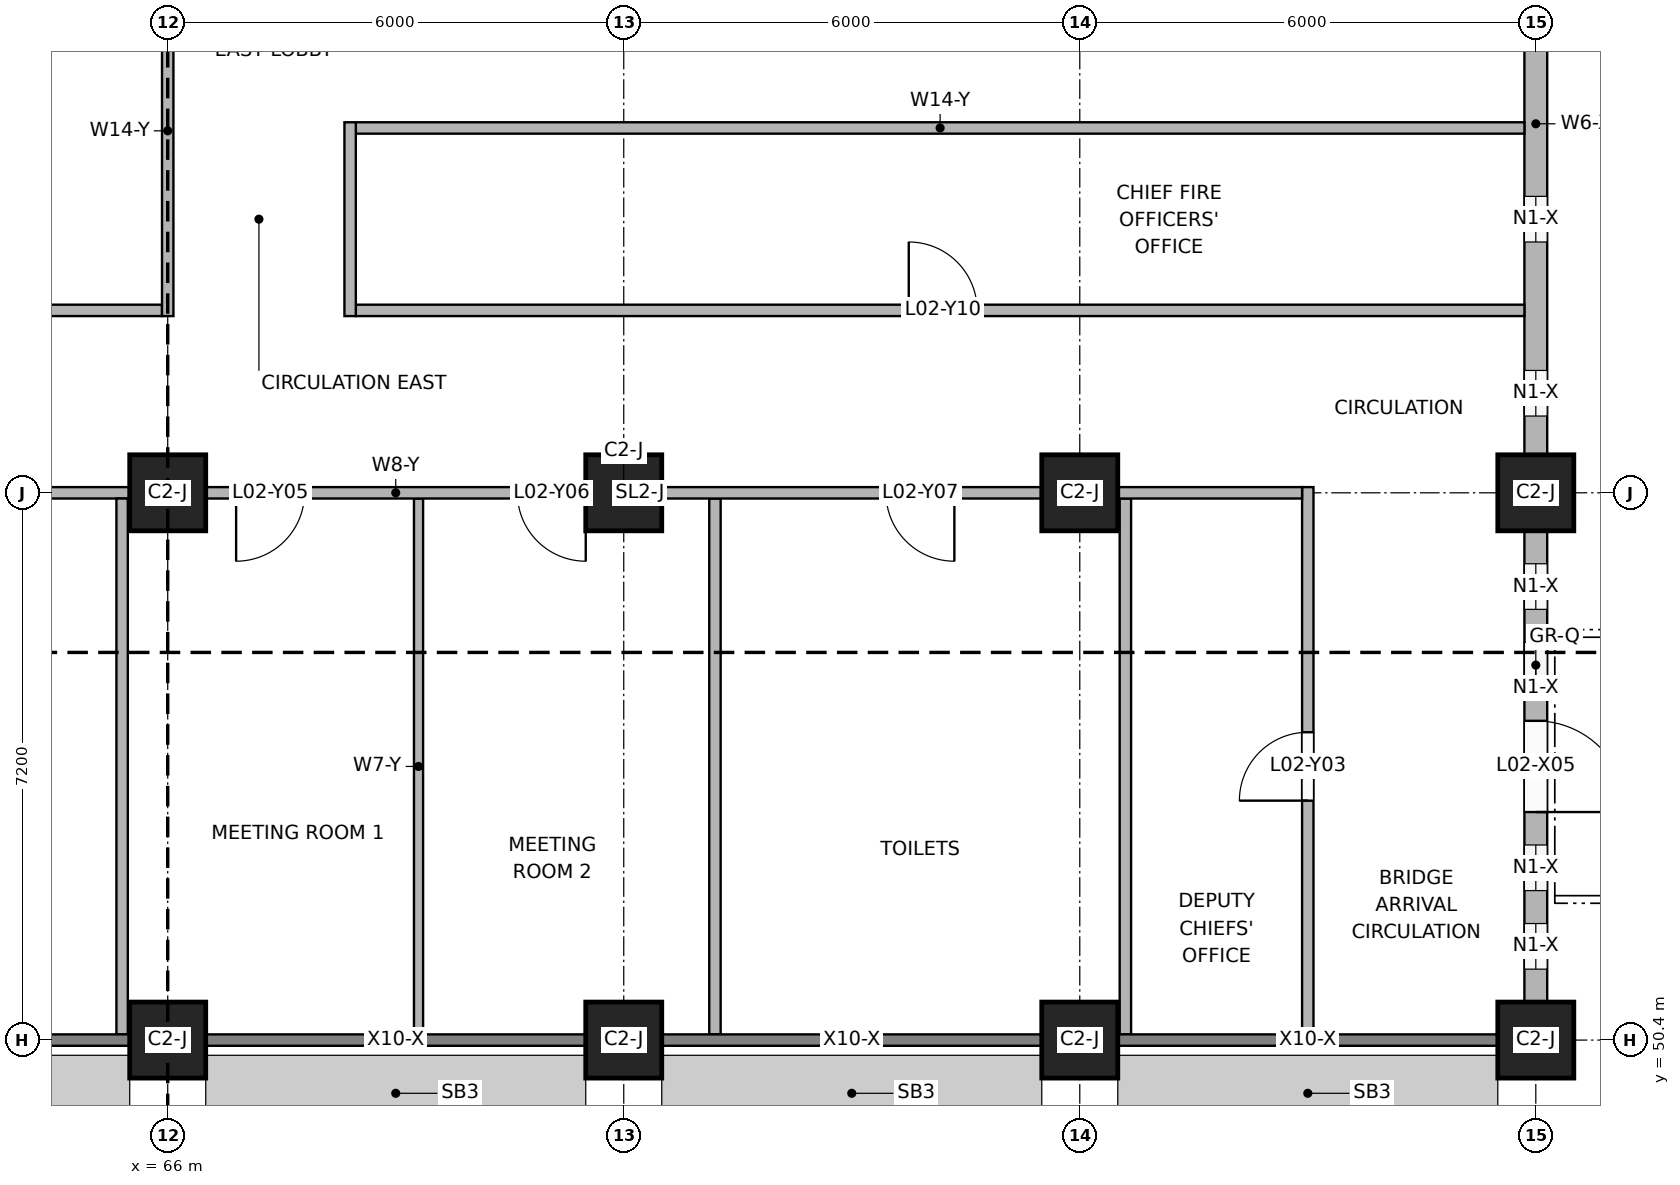
"""IFC4 building model, lengths in metres.
Left out: names, types, materials, properties, quantities, classifications, styles, units other than length and angle.
Written with IfcOpenShell. Run it as: python <this file> out.ifc"""

import sys

from ifc_helpers import new_model, si_unit, direction, frame, frame_2d, origin, origin_2d, place, context, subcontext, project, spatial, rectangle, extrude, element, fill, save


model = new_model("IFC4")
c1 = context("Model", 3, precision=1e-05, world=origin(), true_north=direction((0.0, 1.0)))
c2 = subcontext(c1, "Body", "Model", "MODEL_VIEW")
j1 = project(units=[si_unit("LENGTHUNIT", "METRE"), si_unit("PLANEANGLEUNIT", "RADIAN")], contexts=[c1])
p1 = place(None, origin())
s1 = spatial("IfcSite", under=j1, at=p1, CompositionType="ELEMENT")
p2 = place(p1, origin())
s2 = spatial("IfcBuilding", under=s1, at=p2, CompositionType="ELEMENT")
p3 = place(p2, frame((0.0, 0.0, 8.4)))
s3 = spatial("IfcBuildingStorey", under=s2, at=p3, CompositionType="ELEMENT", Elevation=8.4)
for number, where, z_axis, x_axis in (
    (1, (66.0, 50.4, 0.0), (0.0, 0.0, 1.0), (1.0, 0.0, 0.0)),
    (2, (72.0, 50.4, 0.0), (0.0, 0.0, 1.0), (1.0, 0.0, 0.0)),
    (3, (78.0, 50.4, 0.0), (0.0, 0.0, 1.0), (1.0, 0.0, 0.0)),
    (4, (84.0, 50.4, 0.0), (0.0, 0.0, 1.0), (1.0, 0.0, 0.0)),
    (5, (66.0, 57.6, 0.0), (0.0, 0.0, 1.0), (1.0, 0.0, 0.0)),
    (6, (72.0, 57.6, 0.0), (0.0, 0.0, 1.0), (1.0, 0.0, 0.0)),
    (7, (78.0, 57.6, 0.0), (0.0, 0.0, 1.0), (1.0, 0.0, 0.0)),
    (8, (84.0, 57.6, 0.0), (0.0, 0.0, 1.0), (1.0, 0.0, 0.0)),
):
    element("IfcColumn", number, at=place(p3, frame(where, z_axis=z_axis, x_axis=x_axis)), inside=s3, PredefinedType="COLUMN", context=c2, shape_type="SweptSolid", body=[
        extrude(rectangle(XDim=1.0, YDim=1.0, at=origin_2d()), origin(), (0.0, 0.0, 1.0), 4.0),
    ])
p4 = place(p3, frame((84.0, 50.9, 0.0), z_axis=(0.0, 0.0, 1.0), x_axis=(0.0, 1.0, 0.0)))
e9 = element("IfcWall", 9, at=p4, inside=s3, PredefinedType="SOLIDWALL", context=c2, shape_type="SweptSolid", body=[
    extrude(rectangle(XDim=6.2, YDim=0.3, at=frame_2d((3.1, 0.0))), origin(), (0.0, 0.0, 1.0), 3.1),
])
p5 = place(p4, frame((2.5, 0.0, 0.0)))
e10 = element("IfcOpeningElement", 10, at=p5, cuts=e9, PredefinedType="OPENING", context=c2, shape_type="SweptSolid", body=[
    extrude(rectangle(XDim=1.2, YDim=2.4, at=frame_2d((0.6, 1.2))), frame((0.0, 0.16, 0.0), z_axis=(0.0, -1.0, 0.0), x_axis=(1.0, 0.0, 0.0)), (0.0, 0.0, 1.0), 0.32),
])
p6 = place(p4, frame((0.433, 0.0, 0.9)))
e11 = element("IfcOpeningElement", 11, at=p6, cuts=e9, PredefinedType="OPENING", context=c2, shape_type="SweptSolid", body=[
    extrude(rectangle(XDim=0.6, YDim=1.9, at=frame_2d((0.3, 0.95))), frame((0.0, 0.16, 0.0), z_axis=(0.0, -1.0, 0.0), x_axis=(1.0, 0.0, 0.0)), (0.0, 0.0, 1.0), 0.32),
])
p7 = place(p4, frame((1.467, 0.0, 0.9)))
e12 = element("IfcOpeningElement", 12, at=p7, cuts=e9, PredefinedType="OPENING", context=c2, shape_type="SweptSolid", body=[
    extrude(rectangle(XDim=0.6, YDim=1.9, at=frame_2d((0.3, 0.95))), frame((0.0, 0.16, 0.0), z_axis=(0.0, -1.0, 0.0), x_axis=(1.0, 0.0, 0.0)), (0.0, 0.0, 1.0), 0.32),
])
p8 = place(p4, frame((4.133, 0.0, 0.9)))
e13 = element("IfcOpeningElement", 13, at=p8, cuts=e9, PredefinedType="OPENING", context=c2, shape_type="SweptSolid", body=[
    extrude(rectangle(XDim=0.6, YDim=1.9, at=frame_2d((0.3, 0.95))), frame((0.0, 0.16, 0.0), z_axis=(0.0, -1.0, 0.0), x_axis=(1.0, 0.0, 0.0)), (0.0, 0.0, 1.0), 0.32),
])
p9 = place(p4, frame((5.167, 0.0, 0.9)))
e14 = element("IfcOpeningElement", 14, at=p9, cuts=e9, PredefinedType="OPENING", context=c2, shape_type="SweptSolid", body=[
    extrude(rectangle(XDim=0.6, YDim=1.9, at=frame_2d((0.3, 0.95))), frame((0.0, 0.16, 0.0), z_axis=(0.0, -1.0, 0.0), x_axis=(1.0, 0.0, 0.0)), (0.0, 0.0, 1.0), 0.32),
])
p10 = place(p3, frame((84.0, 58.1, 0.0), z_axis=(0.0, 0.0, 1.0), x_axis=(0.0, 1.0, 0.0)))
e15 = element("IfcWall", 15, at=p10, inside=s3, PredefinedType="SOLIDWALL", context=c2, shape_type="SweptSolid", body=[
    extrude(rectangle(XDim=6.7, YDim=0.3, at=frame_2d((3.35, 0.0))), origin(), (0.0, 0.0, 1.0), 3.1),
])
p11 = place(p10, frame((0.51, 0.0, 0.9)))
e16 = element("IfcOpeningElement", 16, at=p11, cuts=e15, PredefinedType="OPENING", context=c2, shape_type="SweptSolid", body=[
    extrude(rectangle(XDim=0.6, YDim=1.9, at=frame_2d((0.3, 0.95))), frame((0.0, 0.16, 0.0), z_axis=(0.0, -1.0, 0.0), x_axis=(1.0, 0.0, 0.0)), (0.0, 0.0, 1.0), 0.32),
])
p12 = place(p10, frame((2.8, 0.0, 0.9)))
e17 = element("IfcOpeningElement", 17, at=p12, cuts=e15, PredefinedType="OPENING", context=c2, shape_type="SweptSolid", body=[
    extrude(rectangle(XDim=0.6, YDim=1.9, at=frame_2d((0.3, 0.95))), frame((0.0, 0.16, 0.0), z_axis=(0.0, -1.0, 0.0), x_axis=(1.0, 0.0, 0.0)), (0.0, 0.0, 1.0), 0.32),
])
p13 = place(p10, frame((5.34, 0.0, 0.9)))
e18 = element("IfcOpeningElement", 18, at=p13, cuts=e15, PredefinedType="OPENING", context=c2, shape_type="SweptSolid", body=[
    extrude(rectangle(XDim=0.6, YDim=1.9, at=frame_2d((0.3, 0.95))), frame((0.0, 0.16, 0.0), z_axis=(0.0, -1.0, 0.0), x_axis=(1.0, 0.0, 0.0)), (0.0, 0.0, 1.0), 0.32),
])
p14 = place(p3, frame((65.4, 50.475, 0.0), z_axis=(0.0, 0.0, 1.0), x_axis=(0.0, 1.0, 0.0)))
e19 = element("IfcWall", 19, at=p14, inside=s3, PredefinedType="PARTITIONING", context=c2, shape_type="SweptSolid", body=[
    extrude(rectangle(XDim=7.05, YDim=0.15, at=frame_2d((3.525, 0.0))), origin(), (0.0, 0.0, 1.0), 3.2),
])
p15 = place(p3, frame((66.0, 59.925, 0.0), z_axis=(0.0, 0.0, 1.0), x_axis=(0.0, 1.0, 0.0)))
e20 = element("IfcWall", 20, at=p15, inside=s3, PredefinedType="PARTITIONING", context=c2, shape_type="SweptSolid", body=[
    extrude(rectangle(XDim=4.875, YDim=0.15, at=frame_2d((2.438, 0.0))), origin(), (0.0, 0.0, 1.0), 4.0),
])
p16 = place(p3, frame((68.4, 59.925, 0.0), z_axis=(0.0, 0.0, 1.0), x_axis=(0.0, 1.0, 0.0)))
e21 = element("IfcWall", 21, at=p16, inside=s3, PredefinedType="PARTITIONING", context=c2, shape_type="SweptSolid", body=[
    extrude(rectangle(XDim=2.55, YDim=0.15, at=frame_2d((1.275, 0.0))), origin(), (0.0, 0.0, 1.0), 4.0),
])
p17 = place(p3, frame((69.3, 50.475, 0.0), z_axis=(0.0, 0.0, 1.0), x_axis=(0.0, 1.0, 0.0)))
e22 = element("IfcWall", 22, at=p17, inside=s3, PredefinedType="PARTITIONING", context=c2, shape_type="SweptSolid", body=[
    extrude(rectangle(XDim=7.05, YDim=0.12, at=frame_2d((3.525, 0.0))), origin(), (0.0, 0.0, 1.0), 3.2),
])
for number, where, z_axis, x_axis in (
    (23, (73.2, 50.475, 0.0), (0.0, 0.0, 1.0), (0.0, 1.0, 0.0)),
    (24, (78.6, 50.475, 0.0), (0.0, 0.0, 1.0), (0.0, 1.0, 0.0)),
):
    element("IfcWall", number, at=place(p3, frame(where, z_axis=z_axis, x_axis=x_axis)), inside=s3, PredefinedType="PARTITIONING", context=c2, shape_type="SweptSolid", body=[
        extrude(rectangle(XDim=7.05, YDim=0.15, at=frame_2d((3.525, 0.0))), origin(), (0.0, 0.0, 1.0), 3.2),
    ])
p18 = place(p3, frame((81.0, 50.475, 0.0), z_axis=(0.0, 0.0, 1.0), x_axis=(0.0, 1.0, 0.0)))
e25 = element("IfcWall", 25, at=p18, inside=s3, PredefinedType="PARTITIONING", context=c2, shape_type="SweptSolid", body=[
    extrude(rectangle(XDim=7.2, YDim=0.15, at=frame_2d((3.6, 0.0))), origin(), (0.0, 0.0, 1.0), 3.2),
])
p19 = place(p18, frame((3.075, 0.0, 0.0)))
e26 = element("IfcOpeningElement", 26, at=p19, cuts=e25, PredefinedType="OPENING", context=c2, shape_type="SweptSolid", body=[
    extrude(rectangle(XDim=0.9, YDim=2.1, at=frame_2d((0.45, 1.05))), frame((0.0, 0.085, 0.0), z_axis=(0.0, -1.0, 0.0), x_axis=(1.0, 0.0, 0.0)), (0.0, 0.0, 1.0), 0.17),
])
p20 = place(p3, frame((57.075, 57.6, 0.0), z_axis=(0.0, 0.0, 1.0), x_axis=(1.0, 0.0, 0.0)))
e27 = element("IfcWall", 27, at=p20, inside=s3, PredefinedType="PARTITIONING", context=c2, shape_type="SweptSolid", body=[
    extrude(rectangle(XDim=23.85, YDim=0.15, at=frame_2d((11.925, 0.0))), origin(), (0.0, 0.0, 1.0), 3.2),
])
p21 = place(p20, frame((3.525, 0.0, 0.0)))
e28 = element("IfcOpeningElement", 28, at=p21, cuts=e27, PredefinedType="OPENING", context=c2, shape_type="SweptSolid", body=[
    extrude(rectangle(XDim=1.2, YDim=2.1, at=frame_2d((0.6, 1.05))), frame((0.0, 0.085, 0.0), z_axis=(0.0, -1.0, 0.0), x_axis=(1.0, 0.0, 0.0)), (0.0, 0.0, 1.0), 0.17),
])
p22 = place(p20, frame((9.825, 0.0, 0.0)))
e29 = element("IfcOpeningElement", 29, at=p22, cuts=e27, PredefinedType="OPENING", context=c2, shape_type="SweptSolid", body=[
    extrude(rectangle(XDim=0.9, YDim=2.1, at=frame_2d((0.45, 1.05))), frame((0.0, 0.085, 0.0), z_axis=(0.0, -1.0, 0.0), x_axis=(1.0, 0.0, 0.0)), (0.0, 0.0, 1.0), 0.17),
])
p23 = place(p20, frame((13.525, 0.0, 0.0)))
e30 = element("IfcOpeningElement", 30, at=p23, cuts=e27, PredefinedType="OPENING", context=c2, shape_type="SweptSolid", body=[
    extrude(rectangle(XDim=0.9, YDim=2.1, at=frame_2d((0.45, 1.05))), frame((0.0, 0.085, 0.0), z_axis=(0.0, -1.0, 0.0), x_axis=(1.0, 0.0, 0.0)), (0.0, 0.0, 1.0), 0.17),
])
p24 = place(p20, frame((18.375, 0.0, 0.0)))
e31 = element("IfcOpeningElement", 31, at=p24, cuts=e27, PredefinedType="OPENING", context=c2, shape_type="SweptSolid", body=[
    extrude(rectangle(XDim=0.9, YDim=2.1, at=frame_2d((0.45, 1.05))), frame((0.0, 0.085, 0.0), z_axis=(0.0, -1.0, 0.0), x_axis=(1.0, 0.0, 0.0)), (0.0, 0.0, 1.0), 0.17),
])
p25 = place(p3, frame((50.475, 60.0, 0.0), z_axis=(0.0, 0.0, 1.0), x_axis=(1.0, 0.0, 0.0)))
e32 = element("IfcWall", 32, at=p25, inside=s3, PredefinedType="PARTITIONING", context=c2, shape_type="SweptSolid", body=[
    extrude(rectangle(XDim=15.45, YDim=0.15, at=frame_2d((7.725, 0.0))), origin(), (0.0, 0.0, 1.0), 3.1),
])
p26 = place(p25, frame((7.125, 0.0, 0.0)))
e33 = element("IfcOpeningElement", 33, at=p26, cuts=e32, PredefinedType="OPENING", context=c2, shape_type="SweptSolid", body=[
    extrude(rectangle(XDim=1.2, YDim=2.1, at=frame_2d((0.6, 1.05))), frame((0.0, 0.085, 0.0), z_axis=(0.0, -1.0, 0.0), x_axis=(1.0, 0.0, 0.0)), (0.0, 0.0, 1.0), 0.17),
])
p27 = place(p3, frame((68.475, 60.0, 0.0), z_axis=(0.0, 0.0, 1.0), x_axis=(1.0, 0.0, 0.0)))
e34 = element("IfcWall", 34, at=p27, inside=s3, PredefinedType="PARTITIONING", context=c2, shape_type="SweptSolid", body=[
    extrude(rectangle(XDim=15.375, YDim=0.15, at=frame_2d((7.688, 0.0))), origin(), (0.0, 0.0, 1.0), 4.0),
])
p28 = place(p27, frame((7.275, 0.0, 0.0)))
e35 = element("IfcOpeningElement", 35, at=p28, cuts=e34, PredefinedType="OPENING", context=c2, shape_type="SweptSolid", body=[
    extrude(rectangle(XDim=0.9, YDim=2.1, at=frame_2d((0.45, 1.05))), frame((0.0, 0.085, 0.0), z_axis=(0.0, -1.0, 0.0), x_axis=(1.0, 0.0, 0.0)), (0.0, 0.0, 1.0), 0.17),
])
p29 = place(p3, frame((68.475, 62.4, 0.0), z_axis=(0.0, 0.0, 1.0), x_axis=(1.0, 0.0, 0.0)))
e36 = element("IfcWall", 36, at=p29, inside=s3, PredefinedType="PARTITIONING", context=c2, shape_type="SweptSolid", body=[
    extrude(rectangle(XDim=15.375, YDim=0.15, at=frame_2d((7.688, 0.0))), origin(), (0.0, 0.0, 1.0), 4.0),
])
p30 = place(p5, frame((1.2, 0.0, 0.0), z_axis=(0.0, 0.0, 1.0), x_axis=(-1.0, 0.0, 0.0)))
e37 = element("IfcDoor", 37, at=p30, inside=s3, OperationType="SINGLE_SWING_RIGHT", PredefinedType="DOOR", context=c2, shape_type="SweptSolid", body=[
    extrude(rectangle(XDim=1.2, YDim=2.4, at=frame_2d((0.6, 1.2))), frame((0.0, 0.025, 0.0), z_axis=(0.0, -1.0, 0.0), x_axis=(1.0, 0.0, 0.0)), (0.0, 0.0, 1.0), 0.05),
])
fill(e10, e37)
p31 = place(p6, origin())
e38 = element("IfcWindow", 38, at=p31, inside=s3, PartitioningType="SINGLE_PANEL", PredefinedType="WINDOW", context=c2, shape_type="SweptSolid", body=[
    extrude(rectangle(XDim=0.6, YDim=1.9, at=frame_2d((0.3, 0.95))), frame((0.0, 0.03, 0.0), z_axis=(0.0, -1.0, 0.0), x_axis=(1.0, 0.0, 0.0)), (0.0, 0.0, 1.0), 0.06),
])
fill(e11, e38)
p32 = place(p7, origin())
e39 = element("IfcWindow", 39, at=p32, inside=s3, PartitioningType="SINGLE_PANEL", PredefinedType="WINDOW", context=c2, shape_type="SweptSolid", body=[
    extrude(rectangle(XDim=0.6, YDim=1.9, at=frame_2d((0.3, 0.95))), frame((0.0, 0.03, 0.0), z_axis=(0.0, -1.0, 0.0), x_axis=(1.0, 0.0, 0.0)), (0.0, 0.0, 1.0), 0.06),
])
fill(e12, e39)
p33 = place(p8, origin())
e40 = element("IfcWindow", 40, at=p33, inside=s3, PartitioningType="SINGLE_PANEL", PredefinedType="WINDOW", context=c2, shape_type="SweptSolid", body=[
    extrude(rectangle(XDim=0.6, YDim=1.9, at=frame_2d((0.3, 0.95))), frame((0.0, 0.03, 0.0), z_axis=(0.0, -1.0, 0.0), x_axis=(1.0, 0.0, 0.0)), (0.0, 0.0, 1.0), 0.06),
])
fill(e13, e40)
p34 = place(p9, origin())
e41 = element("IfcWindow", 41, at=p34, inside=s3, PartitioningType="SINGLE_PANEL", PredefinedType="WINDOW", context=c2, shape_type="SweptSolid", body=[
    extrude(rectangle(XDim=0.6, YDim=1.9, at=frame_2d((0.3, 0.95))), frame((0.0, 0.03, 0.0), z_axis=(0.0, -1.0, 0.0), x_axis=(1.0, 0.0, 0.0)), (0.0, 0.0, 1.0), 0.06),
])
fill(e14, e41)
p35 = place(p11, origin())
e42 = element("IfcWindow", 42, at=p35, inside=s3, PartitioningType="SINGLE_PANEL", PredefinedType="WINDOW", context=c2, shape_type="SweptSolid", body=[
    extrude(rectangle(XDim=0.6, YDim=1.9, at=frame_2d((0.3, 0.95))), frame((0.0, 0.03, 0.0), z_axis=(0.0, -1.0, 0.0), x_axis=(1.0, 0.0, 0.0)), (0.0, 0.0, 1.0), 0.06),
])
fill(e16, e42)
p36 = place(p12, origin())
e43 = element("IfcWindow", 43, at=p36, inside=s3, PartitioningType="SINGLE_PANEL", PredefinedType="WINDOW", context=c2, shape_type="SweptSolid", body=[
    extrude(rectangle(XDim=0.6, YDim=1.9, at=frame_2d((0.3, 0.95))), frame((0.0, 0.03, 0.0), z_axis=(0.0, -1.0, 0.0), x_axis=(1.0, 0.0, 0.0)), (0.0, 0.0, 1.0), 0.06),
])
fill(e17, e43)
p37 = place(p19, origin())
e44 = element("IfcDoor", 44, at=p37, inside=s3, OperationType="SINGLE_SWING_LEFT", PredefinedType="DOOR", context=c2, shape_type="SweptSolid", body=[
    extrude(rectangle(XDim=0.9, YDim=2.1, at=frame_2d((0.45, 1.05))), frame((0.0, 0.025, 0.0), z_axis=(0.0, -1.0, 0.0), x_axis=(1.0, 0.0, 0.0)), (0.0, 0.0, 1.0), 0.05),
])
fill(e26, e44)
p38 = place(p22, frame((0.9, 0.0, 0.0), z_axis=(0.0, 0.0, 1.0), x_axis=(-1.0, 0.0, 0.0)))
e45 = element("IfcDoor", 45, at=p38, inside=s3, OperationType="SINGLE_SWING_RIGHT", PredefinedType="DOOR", context=c2, shape_type="SweptSolid", body=[
    extrude(rectangle(XDim=0.9, YDim=2.1, at=frame_2d((0.45, 1.05))), frame((0.0, 0.025, 0.0), z_axis=(0.0, -1.0, 0.0), x_axis=(1.0, 0.0, 0.0)), (0.0, 0.0, 1.0), 0.05),
])
fill(e29, e45)
p39 = place(p23, frame((0.9, 0.0, 0.0), z_axis=(0.0, 0.0, 1.0), x_axis=(-1.0, 0.0, 0.0)))
e46 = element("IfcDoor", 46, at=p39, inside=s3, OperationType="SINGLE_SWING_LEFT", PredefinedType="DOOR", context=c2, shape_type="SweptSolid", body=[
    extrude(rectangle(XDim=0.9, YDim=2.1, at=frame_2d((0.45, 1.05))), frame((0.0, 0.025, 0.0), z_axis=(0.0, -1.0, 0.0), x_axis=(1.0, 0.0, 0.0)), (0.0, 0.0, 1.0), 0.05),
])
fill(e30, e46)
p40 = place(p24, frame((0.9, 0.0, 0.0), z_axis=(0.0, 0.0, 1.0), x_axis=(-1.0, 0.0, 0.0)))
e47 = element("IfcDoor", 47, at=p40, inside=s3, OperationType="SINGLE_SWING_LEFT", PredefinedType="DOOR", context=c2, shape_type="SweptSolid", body=[
    extrude(rectangle(XDim=0.9, YDim=2.1, at=frame_2d((0.45, 1.05))), frame((0.0, 0.025, 0.0), z_axis=(0.0, -1.0, 0.0), x_axis=(1.0, 0.0, 0.0)), (0.0, 0.0, 1.0), 0.05),
])
fill(e31, e47)
p41 = place(p28, origin())
e48 = element("IfcDoor", 48, at=p41, inside=s3, OperationType="SINGLE_SWING_LEFT", PredefinedType="DOOR", context=c2, shape_type="SweptSolid", body=[
    extrude(rectangle(XDim=0.9, YDim=2.1, at=frame_2d((0.45, 1.05))), frame((0.0, 0.025, 0.0), z_axis=(0.0, -1.0, 0.0), x_axis=(1.0, 0.0, 0.0)), (0.0, 0.0, 1.0), 0.05),
])
fill(e35, e48)
save(model, sys.argv[1])
